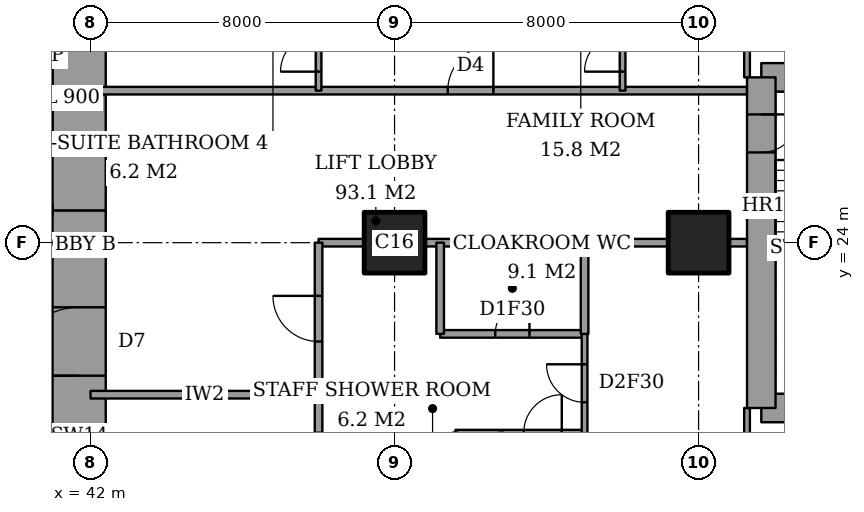
"""IFC4 building model, lengths in metres.
Left out: names, types, materials, properties, quantities, classifications, styles, units other than length and angle.
Written with IfcOpenShell. Run it as: python <this file> out.ifc"""

import sys

from ifc_helpers import new_model, si_unit, direction, frame, frame_2d, origin, origin_2d, place, context, subcontext, project, spatial, rectangle, extrude, element, fill, save


model = new_model("IFC4")
c1 = context("Model", 3, precision=1e-05, world=origin(), true_north=direction((0.0, 1.0)))
c2 = subcontext(c1, "Body", "Model", "MODEL_VIEW")
j1 = project(units=[si_unit("LENGTHUNIT", "METRE"), si_unit("PLANEANGLEUNIT", "RADIAN")], contexts=[c1])
p1 = place(None, origin())
s1 = spatial("IfcSite", under=j1, at=p1, CompositionType="ELEMENT")
p2 = place(p1, origin())
s2 = spatial("IfcBuilding", under=s1, at=p2, CompositionType="ELEMENT")
p3 = place(p2, frame((0.0, 0.0, 244.8)))
s3 = spatial("IfcBuildingStorey", under=s2, at=p3, CompositionType="ELEMENT", Elevation=244.8)
for number, where, z_axis, x_axis in (
    (1, (50.0, 24.0, 0.0), (0.0, 0.0, 1.0), (1.0, 0.0, 0.0)),
    (2, (58.0, 24.0, 0.0), (0.0, 0.0, 1.0), (1.0, 0.0, 0.0)),
):
    element("IfcColumn", number, at=place(p3, frame(where, z_axis=z_axis, x_axis=x_axis)), inside=s3, PredefinedType="COLUMN", context=c2, shape_type="SweptSolid", body=[
        extrude(rectangle(XDim=1.6, YDim=1.6, at=origin_2d()), origin(), (0.0, 0.0, 1.0), 3.6),
    ])
p4 = place(p3, frame((41.7, 13.0, 0.0), z_axis=(0.0, 0.0, 1.0), x_axis=(0.0, 1.0, 0.0)))
e3 = element("IfcWall", 3, at=p4, inside=s3, PredefinedType="SHEAR", context=c2, shape_type="SweptSolid", body=[
    extrude(rectangle(XDim=11.85, YDim=1.4, at=frame_2d((5.925, 0.0))), origin(), (0.0, 0.0, 1.0), 3.6),
])
p5 = place(p4, frame((7.5, 0.0, 0.0)))
e4 = element("IfcOpeningElement", 4, at=p5, cuts=e3, PredefinedType="OPENING", context=c2, shape_type="SweptSolid", body=[
    extrude(rectangle(XDim=1.8, YDim=2.4, at=frame_2d((0.9, 1.2))), frame((0.0, 0.71, 0.0), z_axis=(0.0, -1.0, 0.0), x_axis=(1.0, 0.0, 0.0)), (0.0, 0.0, 1.0), 1.42),
])
p6 = place(p3, frame((41.7, 24.85, 0.0), z_axis=(0.0, 0.0, 1.0), x_axis=(0.0, 1.0, 0.0)))
e5 = element("IfcWall", 5, at=p6, inside=s3, PredefinedType="SHEAR", context=c2, shape_type="SweptSolid", body=[
    extrude(rectangle(XDim=10.15, YDim=1.4, at=frame_2d((5.075, 0.0))), origin(), (0.0, 0.0, 1.0), 3.6),
])
for number, where, z_axis, x_axis in (
    (6, (59.65, 19.65, 0.0), (0.0, 0.0, 1.0), (1.0, 0.0, 0.0)),
    (7, (64.1, 28.35, 0.0), (0.0, 0.0, 1.0), (-1.0, 0.0, 0.0)),
):
    element("IfcWall", number, at=place(p3, frame(where, z_axis=z_axis, x_axis=x_axis)), inside=s3, PredefinedType="SHEAR", context=c2, shape_type="SweptSolid", body=[
        extrude(rectangle(XDim=4.45, YDim=0.75, at=frame_2d((2.225, 0.0))), origin(), (0.0, 0.0, 1.0), 3.6),
    ])
p7 = place(p3, frame((59.65, 28.35, 0.0), z_axis=(0.0, 0.0, 1.0), x_axis=(0.0, -1.0, 0.0)))
e8 = element("IfcWall", 8, at=p7, inside=s3, PredefinedType="SHEAR", context=c2, shape_type="SweptSolid", body=[
    extrude(rectangle(XDim=8.7, YDim=0.75, at=frame_2d((4.35, 0.0))), origin(), (0.0, 0.0, 1.0), 3.6),
])
p8 = place(p7, frame((0.975, 0.0, 0.0)))
e9 = element("IfcOpeningElement", 9, at=p8, cuts=e8, PredefinedType="OPENING", context=c2, shape_type="SweptSolid", body=[
    extrude(rectangle(XDim=1.0, YDim=2.1, at=frame_2d((0.5, 1.05))), frame((0.0, 0.385, 0.0), z_axis=(0.0, -1.0, 0.0), x_axis=(1.0, 0.0, 0.0)), (0.0, 0.0, 1.0), 0.77),
])
p9 = place(p3, frame((51.6, 19.0, 0.0), z_axis=(0.0, 0.0, 1.0), x_axis=(1.0, 0.0, 0.0)))
e10 = element("IfcWall", 10, at=p9, inside=s3, PredefinedType="PARTITIONING", context=c2, shape_type="SweptSolid", body=[
    extrude(rectangle(XDim=3.4, YDim=0.15, at=frame_2d((1.7, 0.0))), origin(), (0.0, 0.0, 1.0), 3.35),
])
p10 = place(p9, frame((1.8, 0.0, 0.0)))
e11 = element("IfcOpeningElement", 11, at=p10, cuts=e10, PredefinedType="OPENING", context=c2, shape_type="SweptSolid", body=[
    extrude(rectangle(XDim=1.0, YDim=2.1, at=frame_2d((0.5, 1.05))), frame((0.0, 0.085, 0.0), z_axis=(0.0, -1.0, 0.0), x_axis=(1.0, 0.0, 0.0)), (0.0, 0.0, 1.0), 0.17),
])
p11 = place(p3, frame((42.0, 20.0, 0.0), z_axis=(0.0, 0.0, 1.0), x_axis=(1.0, 0.0, 0.0)))
e12 = element("IfcWall", 12, at=p11, inside=s3, PredefinedType="PARTITIONING", context=c2, shape_type="SweptSolid", body=[
    extrude(rectangle(XDim=6.0, YDim=0.2, at=frame_2d((3.0, 0.0))), origin(), (0.0, 0.0, 1.0), 3.35),
])
p12 = place(p3, frame((51.2, 21.6, 0.0), z_axis=(0.0, 0.0, 1.0), x_axis=(1.0, 0.0, 0.0)))
e13 = element("IfcWall", 13, at=p12, inside=s3, PredefinedType="PARTITIONING", context=c2, shape_type="SweptSolid", body=[
    extrude(rectangle(XDim=3.8, YDim=0.2, at=frame_2d((1.9, 0.0))), origin(), (0.0, 0.0, 1.0), 3.35),
])
p13 = place(p12, frame((1.45, 0.0, 0.0)))
e14 = element("IfcOpeningElement", 14, at=p13, cuts=e13, PredefinedType="OPENING", context=c2, shape_type="SweptSolid", body=[
    extrude(rectangle(XDim=0.9, YDim=2.1, at=frame_2d((0.45, 1.05))), frame((0.0, 0.11, 0.0), z_axis=(0.0, -1.0, 0.0), x_axis=(1.0, 0.0, 0.0)), (0.0, 0.0, 1.0), 0.22),
])
p14 = place(p3, frame((48.0, 24.0, 0.0), z_axis=(0.0, 0.0, 1.0), x_axis=(1.0, 0.0, 0.0)))
e15 = element("IfcWall", 15, at=p14, inside=s3, PredefinedType="PARTITIONING", context=c2, shape_type="SweptSolid", body=[
    extrude(rectangle(XDim=1.2, YDim=0.2, at=frame_2d((0.6, 0.0))), origin(), (0.0, 0.0, 1.0), 3.35),
])
p15 = place(p3, frame((50.8, 24.0, 0.0), z_axis=(0.0, 0.0, 1.0), x_axis=(1.0, 0.0, 0.0)))
e16 = element("IfcWall", 16, at=p15, inside=s3, PredefinedType="PARTITIONING", context=c2, shape_type="SweptSolid", body=[
    extrude(rectangle(XDim=6.4, YDim=0.2, at=frame_2d((3.2, 0.0))), origin(), (0.0, 0.0, 1.0), 3.35),
])
p16 = place(p3, frame((58.8, 24.0, 0.0), z_axis=(0.0, 0.0, 1.0), x_axis=(1.0, 0.0, 0.0)))
e17 = element("IfcWall", 17, at=p16, inside=s3, PredefinedType="PARTITIONING", context=c2, shape_type="SweptSolid", body=[
    extrude(rectangle(XDim=0.475, YDim=0.2, at=frame_2d((0.237, 0.0))), origin(), (0.0, 0.0, 1.0), 3.35),
])
p17 = place(p3, frame((42.0, 28.0, 0.0), z_axis=(0.0, 0.0, 1.0), x_axis=(1.0, 0.0, 0.0)))
e18 = element("IfcWall", 18, at=p17, inside=s3, PredefinedType="PARTITIONING", context=c2, shape_type="SweptSolid", body=[
    extrude(rectangle(XDim=17.275, YDim=0.2, at=frame_2d((8.637, 0.0))), origin(), (0.0, 0.0, 1.0), 3.35),
])
p18 = place(p17, frame((9.4, 0.0, 0.0)))
e19 = element("IfcOpeningElement", 19, at=p18, cuts=e18, PredefinedType="OPENING", context=c2, shape_type="SweptSolid", body=[
    extrude(rectangle(XDim=1.2, YDim=2.4, at=frame_2d((0.6, 1.2))), frame((0.0, 0.11, 0.0), z_axis=(0.0, -1.0, 0.0), x_axis=(1.0, 0.0, 0.0)), (0.0, 0.0, 1.0), 0.22),
])
p19 = place(p3, frame((48.0, 19.0, 0.0), z_axis=(0.0, 0.0, 1.0), x_axis=(0.0, 1.0, 0.0)))
e20 = element("IfcWall", 20, at=p19, inside=s3, PredefinedType="PARTITIONING", context=c2, shape_type="SweptSolid", body=[
    extrude(rectangle(XDim=5.0, YDim=0.2, at=frame_2d((2.5, 0.0))), origin(), (0.0, 0.0, 1.0), 3.35),
])
p20 = place(p19, frame((2.4, 0.0, 0.0)))
e21 = element("IfcOpeningElement", 21, at=p20, cuts=e20, PredefinedType="OPENING", context=c2, shape_type="SweptSolid", body=[
    extrude(rectangle(XDim=1.2, YDim=2.4, at=frame_2d((0.6, 1.2))), frame((0.0, 0.11, 0.0), z_axis=(0.0, -1.0, 0.0), x_axis=(1.0, 0.0, 0.0)), (0.0, 0.0, 1.0), 0.22),
])
p21 = place(p3, frame((48.0, 28.0, 0.0), z_axis=(0.0, 0.0, 1.0), x_axis=(0.0, 1.0, 0.0)))
e22 = element("IfcWall", 22, at=p21, inside=s3, PredefinedType="PARTITIONING", context=c2, shape_type="SweptSolid", body=[
    extrude(rectangle(XDim=9.2, YDim=0.15, at=frame_2d((4.6, 0.0))), origin(), (0.0, 0.0, 1.0), 3.35),
])
p22 = place(p21, frame((0.5, 0.0, 0.0)))
e23 = element("IfcOpeningElement", 23, at=p22, cuts=e22, PredefinedType="OPENING", context=c2, shape_type="SweptSolid", body=[
    extrude(rectangle(XDim=1.0, YDim=2.1, at=frame_2d((0.5, 1.05))), frame((0.0, 0.085, 0.0), z_axis=(0.0, -1.0, 0.0), x_axis=(1.0, 0.0, 0.0)), (0.0, 0.0, 1.0), 0.17),
])
p23 = place(p3, frame((51.2, 21.6, 0.0), z_axis=(0.0, 0.0, 1.0), x_axis=(0.0, 1.0, 0.0)))
e24 = element("IfcWall", 24, at=p23, inside=s3, PredefinedType="PARTITIONING", context=c2, shape_type="SweptSolid", body=[
    extrude(rectangle(XDim=2.4, YDim=0.2, at=frame_2d((1.2, 0.0))), origin(), (0.0, 0.0, 1.0), 3.35),
])
p24 = place(p3, frame((51.6, 16.05, 0.0), z_axis=(0.0, 0.0, 1.0), x_axis=(0.0, 1.0, 0.0)))
e25 = element("IfcWall", 25, at=p24, inside=s3, PredefinedType="PARTITIONING", context=c2, shape_type="SweptSolid", body=[
    extrude(rectangle(XDim=2.95, YDim=0.15, at=frame_2d((1.475, 0.0))), origin(), (0.0, 0.0, 1.0), 3.35),
])
p25 = place(p3, frame((55.0, 21.6, 0.0), z_axis=(0.0, 0.0, 1.0), x_axis=(0.0, 1.0, 0.0)))
e26 = element("IfcWall", 26, at=p25, inside=s3, PredefinedType="PARTITIONING", context=c2, shape_type="SweptSolid", body=[
    extrude(rectangle(XDim=2.4, YDim=0.2, at=frame_2d((1.2, 0.0))), origin(), (0.0, 0.0, 1.0), 3.35),
])
p26 = place(p3, frame((55.0, 10.6, 0.0), z_axis=(0.0, 0.0, 1.0), x_axis=(0.0, 1.0, 0.0)))
e27 = element("IfcWall", 27, at=p26, inside=s3, PredefinedType="PARTITIONING", context=c2, shape_type="SweptSolid", body=[
    extrude(rectangle(XDim=11.0, YDim=0.15, at=frame_2d((5.5, 0.0))), origin(), (0.0, 0.0, 1.0), 3.35),
])
p27 = place(p26, frame((9.2, 0.0, 0.0)))
e28 = element("IfcOpeningElement", 28, at=p27, cuts=e27, PredefinedType="OPENING", context=c2, shape_type="SweptSolid", body=[
    extrude(rectangle(XDim=1.0, YDim=2.1, at=frame_2d((0.5, 1.05))), frame((0.0, 0.085, 0.0), z_axis=(0.0, -1.0, 0.0), x_axis=(1.0, 0.0, 0.0)), (0.0, 0.0, 1.0), 0.17),
])
p28 = place(p3, frame((56.0, 28.0, 0.0), z_axis=(0.0, 0.0, 1.0), x_axis=(0.0, 1.0, 0.0)))
e29 = element("IfcWall", 29, at=p28, inside=s3, PredefinedType="PARTITIONING", context=c2, shape_type="SweptSolid", body=[
    extrude(rectangle(XDim=9.2, YDim=0.15, at=frame_2d((4.6, 0.0))), origin(), (0.0, 0.0, 1.0), 3.35),
])
p29 = place(p28, frame((0.5, 0.0, 0.0)))
e30 = element("IfcOpeningElement", 30, at=p29, cuts=e29, PredefinedType="OPENING", context=c2, shape_type="SweptSolid", body=[
    extrude(rectangle(XDim=1.0, YDim=2.1, at=frame_2d((0.5, 1.05))), frame((0.0, 0.085, 0.0), z_axis=(0.0, -1.0, 0.0), x_axis=(1.0, 0.0, 0.0)), (0.0, 0.0, 1.0), 0.17),
])
p30 = place(p3, frame((59.275, 17.2, 0.0), z_axis=(0.0, 0.0, 1.0), x_axis=(0.0, 1.0, 0.0)))
e31 = element("IfcWall", 31, at=p30, inside=s3, PredefinedType="PARTITIONING", context=c2, shape_type="SweptSolid", body=[
    extrude(rectangle(XDim=2.45, YDim=0.15, at=frame_2d((1.225, 0.0))), origin(), (0.0, 0.0, 1.0), 3.35),
])
p31 = place(p30, frame((0.538, 0.0, 0.0)))
e32 = element("IfcOpeningElement", 32, at=p31, cuts=e31, PredefinedType="OPENING", context=c2, shape_type="SweptSolid", body=[
    extrude(rectangle(XDim=1.0, YDim=2.1, at=frame_2d((0.5, 1.05))), frame((0.0, 0.085, 0.0), z_axis=(0.0, -1.0, 0.0), x_axis=(1.0, 0.0, 0.0)), (0.0, 0.0, 1.0), 0.17),
])
p32 = place(p3, frame((59.275, 28.35, 0.0), z_axis=(0.0, 0.0, 1.0), x_axis=(0.0, 1.0, 0.0)))
e33 = element("IfcWall", 33, at=p32, inside=s3, PredefinedType="PARTITIONING", context=c2, shape_type="SweptSolid", body=[
    extrude(rectangle(XDim=2.45, YDim=0.15, at=frame_2d((1.225, 0.0))), origin(), (0.0, 0.0, 1.0), 3.35),
])
p33 = place(p32, frame((0.913, 0.0, 0.0)))
e34 = element("IfcOpeningElement", 34, at=p33, cuts=e33, PredefinedType="OPENING", context=c2, shape_type="SweptSolid", body=[
    extrude(rectangle(XDim=1.0, YDim=2.1, at=frame_2d((0.5, 1.05))), frame((0.0, 0.085, 0.0), z_axis=(0.0, -1.0, 0.0), x_axis=(1.0, 0.0, 0.0)), (0.0, 0.0, 1.0), 0.17),
])
p34 = place(p27, origin())
e35 = element("IfcDoor", 35, at=p34, inside=s3, OperationType="SINGLE_SWING_LEFT", PredefinedType="DOOR", context=c2, shape_type="SweptSolid", body=[
    extrude(rectangle(XDim=1.0, YDim=2.1, at=frame_2d((0.5, 1.05))), frame((0.0, 0.025, 0.0), z_axis=(0.0, -1.0, 0.0), x_axis=(1.0, 0.0, 0.0)), (0.0, 0.0, 1.0), 0.05),
])
fill(e28, e35)
p35 = place(p13, origin())
e36 = element("IfcDoor", 36, at=p35, inside=s3, OperationType="SINGLE_SWING_LEFT", PredefinedType="DOOR", context=c2, shape_type="SweptSolid", body=[
    extrude(rectangle(XDim=0.9, YDim=2.1, at=frame_2d((0.45, 1.05))), frame((0.0, 0.025, 0.0), z_axis=(0.0, -1.0, 0.0), x_axis=(1.0, 0.0, 0.0)), (0.0, 0.0, 1.0), 0.05),
])
fill(e14, e36)
p36 = place(p20, origin())
e37 = element("IfcDoor", 37, at=p36, inside=s3, OperationType="SINGLE_SWING_LEFT", PredefinedType="DOOR", context=c2, shape_type="SweptSolid", body=[
    extrude(rectangle(XDim=1.2, YDim=2.4, at=frame_2d((0.6, 1.2))), frame((0.0, 0.025, 0.0), z_axis=(0.0, -1.0, 0.0), x_axis=(1.0, 0.0, 0.0)), (0.0, 0.0, 1.0), 0.05),
])
fill(e21, e37)
p37 = place(p10, origin())
e38 = element("IfcDoor", 38, at=p37, inside=s3, OperationType="SINGLE_SWING_LEFT", PredefinedType="DOOR", context=c2, shape_type="SweptSolid", body=[
    extrude(rectangle(XDim=1.0, YDim=2.1, at=frame_2d((0.5, 1.05))), frame((0.0, 0.025, 0.0), z_axis=(0.0, -1.0, 0.0), x_axis=(1.0, 0.0, 0.0)), (0.0, 0.0, 1.0), 0.05),
])
fill(e11, e38)
p38 = place(p29, origin())
e39 = element("IfcDoor", 39, at=p38, inside=s3, OperationType="SINGLE_SWING_RIGHT", PredefinedType="DOOR", context=c2, shape_type="SweptSolid", body=[
    extrude(rectangle(XDim=1.0, YDim=2.1, at=frame_2d((0.5, 1.05))), frame((0.0, 0.025, 0.0), z_axis=(0.0, -1.0, 0.0), x_axis=(1.0, 0.0, 0.0)), (0.0, 0.0, 1.0), 0.05),
])
fill(e30, e39)
p39 = place(p18, origin())
e40 = element("IfcDoor", 40, at=p39, inside=s3, OperationType="SINGLE_SWING_LEFT", PredefinedType="DOOR", context=c2, shape_type="SweptSolid", body=[
    extrude(rectangle(XDim=1.2, YDim=2.4, at=frame_2d((0.6, 1.2))), frame((0.0, 0.025, 0.0), z_axis=(0.0, -1.0, 0.0), x_axis=(1.0, 0.0, 0.0)), (0.0, 0.0, 1.0), 0.05),
])
fill(e19, e40)
p40 = place(p22, origin())
e41 = element("IfcDoor", 41, at=p40, inside=s3, OperationType="SINGLE_SWING_RIGHT", PredefinedType="DOOR", context=c2, shape_type="SweptSolid", body=[
    extrude(rectangle(XDim=1.0, YDim=2.1, at=frame_2d((0.5, 1.05))), frame((0.0, 0.025, 0.0), z_axis=(0.0, -1.0, 0.0), x_axis=(1.0, 0.0, 0.0)), (0.0, 0.0, 1.0), 0.05),
])
fill(e23, e41)
p41 = place(p5, origin())
e42 = element("IfcDoor", 42, at=p41, inside=s3, OperationType="DOUBLE_DOOR_DOUBLE_SWING", PredefinedType="DOOR", context=c2, shape_type="SweptSolid", body=[
    extrude(rectangle(XDim=1.8, YDim=2.4, at=frame_2d((0.9, 1.2))), frame((0.0, 0.025, 0.0), z_axis=(0.0, -1.0, 0.0), x_axis=(1.0, 0.0, 0.0)), (0.0, 0.0, 1.0), 0.05),
])
fill(e4, e42)
p42 = place(p8, origin())
e43 = element("IfcDoor", 43, at=p42, inside=s3, OperationType="SINGLE_SWING_RIGHT", PredefinedType="DOOR", context=c2, shape_type="SweptSolid", body=[
    extrude(rectangle(XDim=1.0, YDim=2.1, at=frame_2d((0.5, 1.05))), frame((0.0, 0.025, 0.0), z_axis=(0.0, -1.0, 0.0), x_axis=(1.0, 0.0, 0.0)), (0.0, 0.0, 1.0), 0.05),
])
fill(e9, e43)
save(model, sys.argv[1])
